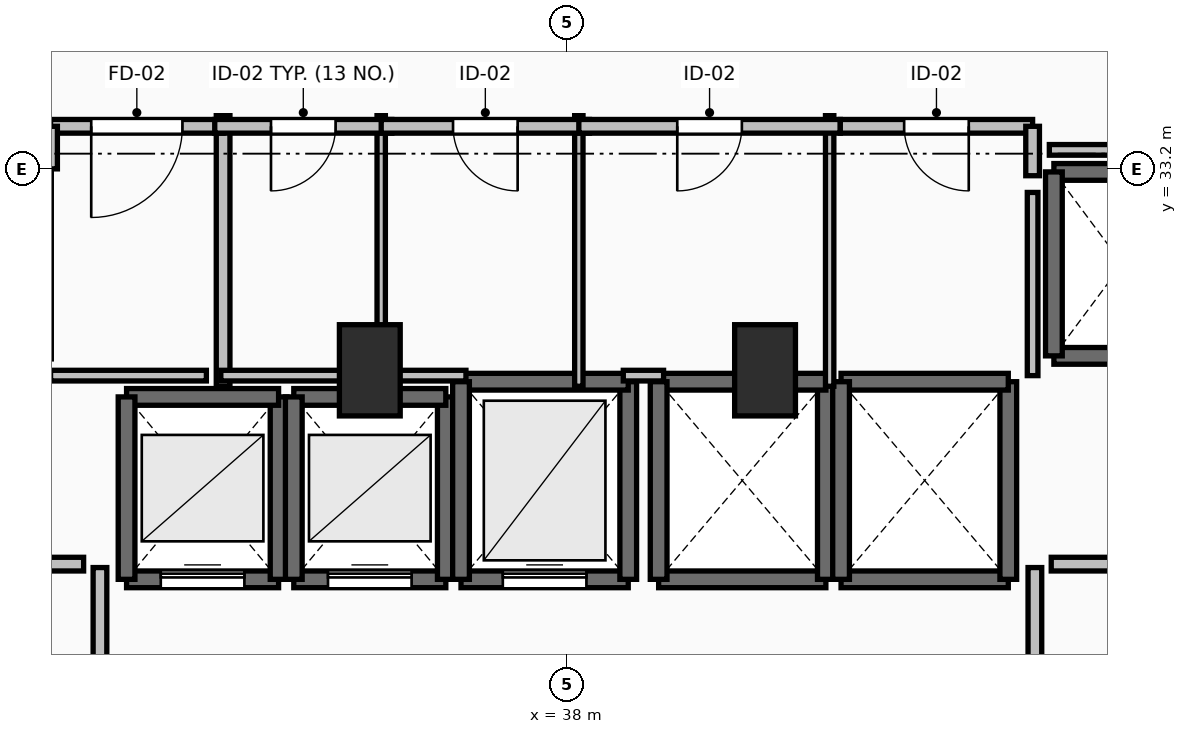
"""IFC4 building model, lengths in metres.
Left out: names, types, materials, properties, quantities, classifications, styles, units other than length and angle.
Written with IfcOpenShell. Run it as: python <this file> out.ifc"""

import sys

from ifc_helpers import new_model, si_unit, direction, frame, frame_2d, origin, origin_2d, place, context, subcontext, project, spatial, rectangle, extrude, element, fill, save


model = new_model("IFC4")
c1 = context("Model", 3, precision=1e-05, world=origin(), true_north=direction((0.0, 1.0)))
c2 = subcontext(c1, "Body", "Model", "MODEL_VIEW")
j1 = project(units=[si_unit("LENGTHUNIT", "METRE"), si_unit("PLANEANGLEUNIT", "RADIAN")], contexts=[c1])
p1 = place(None, origin())
s1 = spatial("IfcSite", under=j1, at=p1, CompositionType="ELEMENT")
p2 = place(p1, origin())
s2 = spatial("IfcBuilding", under=s1, at=p2, CompositionType="ELEMENT")
p3 = place(p2, frame((0.0, 0.0, 103.3)))
s3 = spatial("IfcBuildingStorey", under=s2, at=p3, CompositionType="ELEMENT", Elevation=103.3)
for number, where, z_axis, x_axis in (
    (1, (35.4, 30.55, 0.0), (0.0, 0.0, 1.0), (1.0, 0.0, 0.0)),
    (2, (40.6, 30.55, 0.0), (0.0, 0.0, 1.0), (1.0, 0.0, 0.0)),
):
    element("IfcColumn", number, at=place(p3, frame(where, z_axis=z_axis, x_axis=x_axis)), inside=s3, PredefinedType="PILASTER", context=c2, shape_type="SweptSolid", body=[
        extrude(rectangle(XDim=0.8, YDim=1.2, at=origin_2d()), origin(), (0.0, 0.0, 1.0), 3.5),
    ])
p4 = place(p3, frame((32.2, 27.8, 0.0), z_axis=(0.0, 0.0, 1.0), x_axis=(1.0, 0.0, 0.0)))
e3 = element("IfcWall", 3, at=p4, inside=s3, PredefinedType="SOLIDWALL", context=c2, shape_type="SweptSolid", body=[
    extrude(rectangle(XDim=2.0, YDim=0.22, at=frame_2d((1.0, 0.0))), origin(), (0.0, 0.0, 1.0), 3.24),
])
p5 = place(p4, frame((0.45, 0.0, 0.0)))
e4 = element("IfcOpeningElement", 4, at=p5, cuts=e3, PredefinedType="OPENING", context=c2, shape_type="SweptSolid", body=[
    extrude(rectangle(XDim=1.1, YDim=2.2, at=frame_2d((0.55, 1.1))), frame((0.0, 0.125, 0.0), z_axis=(0.0, -1.0, 0.0), x_axis=(1.0, 0.0, 0.0)), (0.0, 0.0, 1.0), 0.25),
])
p6 = place(p3, frame((34.2, 27.8, 0.0), z_axis=(0.0, 0.0, 1.0), x_axis=(0.0, 1.0, 0.0)))
e5 = element("IfcWall", 5, at=p6, inside=s3, PredefinedType="SOLIDWALL", context=c2, shape_type="SweptSolid", body=[
    extrude(rectangle(XDim=2.4, YDim=0.22, at=frame_2d((1.2, 0.0))), origin(), (0.0, 0.0, 1.0), 3.24),
])
p7 = place(p3, frame((34.2, 30.2, 0.0), z_axis=(0.0, 0.0, 1.0), x_axis=(-1.0, 0.0, 0.0)))
e6 = element("IfcWall", 6, at=p7, inside=s3, PredefinedType="SOLIDWALL", context=c2, shape_type="SweptSolid", body=[
    extrude(rectangle(XDim=2.0, YDim=0.22, at=frame_2d((1.0, 0.0))), origin(), (0.0, 0.0, 1.0), 3.24),
])
p8 = place(p3, frame((32.2, 30.2, 0.0), z_axis=(0.0, 0.0, 1.0), x_axis=(0.0, -1.0, 0.0)))
e7 = element("IfcWall", 7, at=p8, inside=s3, PredefinedType="SOLIDWALL", context=c2, shape_type="SweptSolid", body=[
    extrude(rectangle(XDim=2.4, YDim=0.22, at=frame_2d((1.2, 0.0))), origin(), (0.0, 0.0, 1.0), 3.24),
])
p9 = place(p3, frame((34.4, 27.8, 0.0), z_axis=(0.0, 0.0, 1.0), x_axis=(1.0, 0.0, 0.0)))
e8 = element("IfcWall", 8, at=p9, inside=s3, PredefinedType="SOLIDWALL", context=c2, shape_type="SweptSolid", body=[
    extrude(rectangle(XDim=2.0, YDim=0.22, at=frame_2d((1.0, 0.0))), origin(), (0.0, 0.0, 1.0), 3.24),
])
p10 = place(p9, frame((0.45, 0.0, 0.0)))
e9 = element("IfcOpeningElement", 9, at=p10, cuts=e8, PredefinedType="OPENING", context=c2, shape_type="SweptSolid", body=[
    extrude(rectangle(XDim=1.1, YDim=2.2, at=frame_2d((0.55, 1.1))), frame((0.0, 0.125, 0.0), z_axis=(0.0, -1.0, 0.0), x_axis=(1.0, 0.0, 0.0)), (0.0, 0.0, 1.0), 0.25),
])
p11 = place(p3, frame((36.4, 27.8, 0.0), z_axis=(0.0, 0.0, 1.0), x_axis=(0.0, 1.0, 0.0)))
e10 = element("IfcWall", 10, at=p11, inside=s3, PredefinedType="SOLIDWALL", context=c2, shape_type="SweptSolid", body=[
    extrude(rectangle(XDim=2.4, YDim=0.22, at=frame_2d((1.2, 0.0))), origin(), (0.0, 0.0, 1.0), 3.24),
])
p12 = place(p3, frame((36.4, 30.2, 0.0), z_axis=(0.0, 0.0, 1.0), x_axis=(-1.0, 0.0, 0.0)))
e11 = element("IfcWall", 11, at=p12, inside=s3, PredefinedType="SOLIDWALL", context=c2, shape_type="SweptSolid", body=[
    extrude(rectangle(XDim=2.0, YDim=0.22, at=frame_2d((1.0, 0.0))), origin(), (0.0, 0.0, 1.0), 3.24),
])
p13 = place(p3, frame((34.4, 30.2, 0.0), z_axis=(0.0, 0.0, 1.0), x_axis=(0.0, -1.0, 0.0)))
e12 = element("IfcWall", 12, at=p13, inside=s3, PredefinedType="SOLIDWALL", context=c2, shape_type="SweptSolid", body=[
    extrude(rectangle(XDim=2.4, YDim=0.22, at=frame_2d((1.2, 0.0))), origin(), (0.0, 0.0, 1.0), 3.24),
])
p14 = place(p3, frame((36.6, 27.8, 0.0), z_axis=(0.0, 0.0, 1.0), x_axis=(1.0, 0.0, 0.0)))
e13 = element("IfcWall", 13, at=p14, inside=s3, PredefinedType="SOLIDWALL", context=c2, shape_type="SweptSolid", body=[
    extrude(rectangle(XDim=2.2, YDim=0.22, at=frame_2d((1.1, 0.0))), origin(), (0.0, 0.0, 1.0), 3.24),
])
p15 = place(p14, frame((0.55, 0.0, 0.0)))
e14 = element("IfcOpeningElement", 14, at=p15, cuts=e13, PredefinedType="OPENING", context=c2, shape_type="SweptSolid", body=[
    extrude(rectangle(XDim=1.1, YDim=2.2, at=frame_2d((0.55, 1.1))), frame((0.0, 0.125, 0.0), z_axis=(0.0, -1.0, 0.0), x_axis=(1.0, 0.0, 0.0)), (0.0, 0.0, 1.0), 0.25),
])
p16 = place(p3, frame((38.8, 27.8, 0.0), z_axis=(0.0, 0.0, 1.0), x_axis=(0.0, 1.0, 0.0)))
e15 = element("IfcWall", 15, at=p16, inside=s3, PredefinedType="SOLIDWALL", context=c2, shape_type="SweptSolid", body=[
    extrude(rectangle(XDim=2.6, YDim=0.22, at=frame_2d((1.3, 0.0))), origin(), (0.0, 0.0, 1.0), 3.24),
])
p17 = place(p3, frame((38.8, 30.4, 0.0), z_axis=(0.0, 0.0, 1.0), x_axis=(-1.0, 0.0, 0.0)))
e16 = element("IfcWall", 16, at=p17, inside=s3, PredefinedType="SOLIDWALL", context=c2, shape_type="SweptSolid", body=[
    extrude(rectangle(XDim=2.2, YDim=0.22, at=frame_2d((1.1, 0.0))), origin(), (0.0, 0.0, 1.0), 3.24),
])
p18 = place(p3, frame((36.6, 30.4, 0.0), z_axis=(0.0, 0.0, 1.0), x_axis=(0.0, -1.0, 0.0)))
e17 = element("IfcWall", 17, at=p18, inside=s3, PredefinedType="SOLIDWALL", context=c2, shape_type="SweptSolid", body=[
    extrude(rectangle(XDim=2.6, YDim=0.22, at=frame_2d((1.3, 0.0))), origin(), (0.0, 0.0, 1.0), 3.24),
])
p19 = place(p3, frame((39.2, 27.8, 0.0), z_axis=(0.0, 0.0, 1.0), x_axis=(1.0, 0.0, 0.0)))
e18 = element("IfcWall", 18, at=p19, inside=s3, PredefinedType="SOLIDWALL", context=c2, shape_type="SweptSolid", body=[
    extrude(rectangle(XDim=2.2, YDim=0.22, at=frame_2d((1.1, 0.0))), origin(), (0.0, 0.0, 1.0), 3.24),
])
p20 = place(p3, frame((41.4, 27.8, 0.0), z_axis=(0.0, 0.0, 1.0), x_axis=(0.0, 1.0, 0.0)))
e19 = element("IfcWall", 19, at=p20, inside=s3, PredefinedType="SOLIDWALL", context=c2, shape_type="SweptSolid", body=[
    extrude(rectangle(XDim=2.6, YDim=0.22, at=frame_2d((1.3, 0.0))), origin(), (0.0, 0.0, 1.0), 3.24),
])
p21 = place(p3, frame((41.4, 30.4, 0.0), z_axis=(0.0, 0.0, 1.0), x_axis=(-1.0, 0.0, 0.0)))
e20 = element("IfcWall", 20, at=p21, inside=s3, PredefinedType="SOLIDWALL", context=c2, shape_type="SweptSolid", body=[
    extrude(rectangle(XDim=2.2, YDim=0.22, at=frame_2d((1.1, 0.0))), origin(), (0.0, 0.0, 1.0), 3.24),
])
p22 = place(p3, frame((39.2, 30.4, 0.0), z_axis=(0.0, 0.0, 1.0), x_axis=(0.0, -1.0, 0.0)))
e21 = element("IfcWall", 21, at=p22, inside=s3, PredefinedType="SOLIDWALL", context=c2, shape_type="SweptSolid", body=[
    extrude(rectangle(XDim=2.6, YDim=0.22, at=frame_2d((1.3, 0.0))), origin(), (0.0, 0.0, 1.0), 3.24),
])
p23 = place(p3, frame((41.6, 27.8, 0.0), z_axis=(0.0, 0.0, 1.0), x_axis=(1.0, 0.0, 0.0)))
e22 = element("IfcWall", 22, at=p23, inside=s3, PredefinedType="SOLIDWALL", context=c2, shape_type="SweptSolid", body=[
    extrude(rectangle(XDim=2.2, YDim=0.22, at=frame_2d((1.1, 0.0))), origin(), (0.0, 0.0, 1.0), 3.24),
])
p24 = place(p3, frame((43.8, 27.8, 0.0), z_axis=(0.0, 0.0, 1.0), x_axis=(0.0, 1.0, 0.0)))
e23 = element("IfcWall", 23, at=p24, inside=s3, PredefinedType="SOLIDWALL", context=c2, shape_type="SweptSolid", body=[
    extrude(rectangle(XDim=2.6, YDim=0.22, at=frame_2d((1.3, 0.0))), origin(), (0.0, 0.0, 1.0), 3.24),
])
p25 = place(p3, frame((43.8, 30.4, 0.0), z_axis=(0.0, 0.0, 1.0), x_axis=(-1.0, 0.0, 0.0)))
e24 = element("IfcWall", 24, at=p25, inside=s3, PredefinedType="SOLIDWALL", context=c2, shape_type="SweptSolid", body=[
    extrude(rectangle(XDim=2.2, YDim=0.22, at=frame_2d((1.1, 0.0))), origin(), (0.0, 0.0, 1.0), 3.24),
])
p26 = place(p3, frame((41.6, 30.4, 0.0), z_axis=(0.0, 0.0, 1.0), x_axis=(0.0, -1.0, 0.0)))
e25 = element("IfcWall", 25, at=p26, inside=s3, PredefinedType="SOLIDWALL", context=c2, shape_type="SweptSolid", body=[
    extrude(rectangle(XDim=2.6, YDim=0.22, at=frame_2d((1.3, 0.0))), origin(), (0.0, 0.0, 1.0), 3.24),
])
for number, where, z_axis, x_axis in (
    (26, (44.4, 30.74, 0.0), (0.0, 0.0, 1.0), (1.0, 0.0, 0.0)),
    (27, (46.2, 33.16, 0.0), (0.0, 0.0, 1.0), (-1.0, 0.0, 0.0)),
):
    element("IfcWall", number, at=place(p3, frame(where, z_axis=z_axis, x_axis=x_axis)), inside=s3, PredefinedType="SOLIDWALL", context=c2, shape_type="SweptSolid", body=[
        extrude(rectangle(XDim=1.8, YDim=0.22, at=frame_2d((0.9, 0.0))), origin(), (0.0, 0.0, 1.0), 3.24),
    ])
p27 = place(p3, frame((44.4, 33.16, 0.0), z_axis=(0.0, 0.0, 1.0), x_axis=(0.0, -1.0, 0.0)))
e28 = element("IfcWall", 28, at=p27, inside=s3, PredefinedType="SOLIDWALL", context=c2, shape_type="SweptSolid", body=[
    extrude(rectangle(XDim=2.42, YDim=0.22, at=frame_2d((1.21, 0.0))), origin(), (0.0, 0.0, 1.0), 3.24),
])
p28 = place(p3, frame((31.85, 24.045, 0.0), z_axis=(0.0, 0.0, 1.0), x_axis=(0.0, 1.0, 0.0)))
e29 = element("IfcWall", 29, at=p28, inside=s3, PredefinedType="PARTITIONING", context=c2, shape_type="SweptSolid", body=[
    extrude(rectangle(XDim=3.91, YDim=0.18, at=frame_2d((1.955, 0.0))), origin(), (0.0, 0.0, 1.0), 3.24),
])
p29 = place(p28, frame((1.355, 0.0, 0.0)))
e30 = element("IfcOpeningElement", 30, at=p29, cuts=e29, PredefinedType="OPENING", context=c2, shape_type="SweptSolid", body=[
    extrude(rectangle(XDim=1.2, YDim=2.15, at=frame_2d((0.6, 1.075))), frame((0.0, 0.105, 0.0), z_axis=(0.0, -1.0, 0.0), x_axis=(1.0, 0.0, 0.0)), (0.0, 0.0, 1.0), 0.21),
])
p30 = place(p3, frame((44.15, 27.955, 0.0), z_axis=(0.0, 0.0, 1.0), x_axis=(0.0, -1.0, 0.0)))
e31 = element("IfcWall", 31, at=p30, inside=s3, PredefinedType="PARTITIONING", context=c2, shape_type="SweptSolid", body=[
    extrude(rectangle(XDim=3.91, YDim=0.18, at=frame_2d((1.955, 0.0))), origin(), (0.0, 0.0, 1.0), 3.24),
])
p31 = place(p30, frame((1.355, 0.0, 0.0)))
e32 = element("IfcOpeningElement", 32, at=p31, cuts=e31, PredefinedType="OPENING", context=c2, shape_type="SweptSolid", body=[
    extrude(rectangle(XDim=1.2, YDim=2.15, at=frame_2d((0.6, 1.075))), frame((0.0, 0.105, 0.0), z_axis=(0.0, -1.0, 0.0), x_axis=(1.0, 0.0, 0.0)), (0.0, 0.0, 1.0), 0.21),
])
p32 = place(p3, frame((33.47, 30.34, 0.0), z_axis=(0.0, 0.0, 1.0), x_axis=(0.0, 1.0, 0.0)))
e33 = element("IfcWall", 33, at=p32, inside=s3, PredefinedType="PARTITIONING", context=c2, shape_type="SweptSolid", body=[
    extrude(rectangle(XDim=3.56, YDim=0.18, at=frame_2d((1.78, 0.0))), origin(), (0.0, 0.0, 1.0), 3.24),
])
p33 = place(p3, frame((33.47, 33.76, 0.0), z_axis=(0.0, 0.0, 1.0), x_axis=(-1.0, 0.0, 0.0)))
e34 = element("IfcWall", 34, at=p33, inside=s3, PredefinedType="PARTITIONING", context=c2, shape_type="SweptSolid", body=[
    extrude(rectangle(XDim=2.27, YDim=0.18, at=frame_2d((1.135, 0.0))), origin(), (0.0, 0.0, 1.0), 3.24),
])
p34 = place(p33, frame((0.535, 0.0, 0.0)))
e35 = element("IfcOpeningElement", 35, at=p34, cuts=e34, PredefinedType="OPENING", context=c2, shape_type="SweptSolid", body=[
    extrude(rectangle(XDim=1.2, YDim=2.15, at=frame_2d((0.6, 1.075))), frame((0.0, 0.105, 0.0), z_axis=(0.0, -1.0, 0.0), x_axis=(1.0, 0.0, 0.0)), (0.0, 0.0, 1.0), 0.21),
])
p35 = place(p3, frame((31.2, 33.76, 0.0), z_axis=(0.0, 0.0, 1.0), x_axis=(0.0, -1.0, 0.0)))
e36 = element("IfcWall", 36, at=p35, inside=s3, PredefinedType="PARTITIONING", context=c2, shape_type="SweptSolid", body=[
    extrude(rectangle(XDim=0.56, YDim=0.18, at=frame_2d((0.28, 0.0))), origin(), (0.0, 0.0, 1.0), 3.24),
])
p36 = place(p3, frame((35.55, 30.34, 0.0), z_axis=(0.0, 0.0, 1.0), x_axis=(0.0, 1.0, 0.0)))
e37 = element("IfcWall", 37, at=p36, inside=s3, PredefinedType="PARTITIONING", context=c2, shape_type="SweptSolid", body=[
    extrude(rectangle(XDim=3.56, YDim=0.11, at=frame_2d((1.78, 0.0))), origin(), (0.0, 0.0, 1.0), 2.432),
])
p37 = place(p3, frame((35.69, 33.76, 0.0), z_axis=(0.0, 0.0, 1.0), x_axis=(-1.0, 0.0, 0.0)))
e38 = element("IfcWall", 38, at=p37, inside=s3, PredefinedType="PARTITIONING", context=c2, shape_type="SweptSolid", body=[
    extrude(rectangle(XDim=2.33, YDim=0.18, at=frame_2d((1.165, 0.0))), origin(), (0.0, 0.0, 1.0), 3.24),
])
p38 = place(p37, frame((0.74, 0.0, 0.0)))
e39 = element("IfcOpeningElement", 39, at=p38, cuts=e38, PredefinedType="OPENING", context=c2, shape_type="SweptSolid", body=[
    extrude(rectangle(XDim=0.85, YDim=2.1, at=frame_2d((0.425, 1.05))), frame((0.0, 0.105, 0.0), z_axis=(0.0, -1.0, 0.0), x_axis=(1.0, 0.0, 0.0)), (0.0, 0.0, 1.0), 0.21),
])
p39 = place(p3, frame((38.15, 30.34, 0.0), z_axis=(0.0, 0.0, 1.0), x_axis=(0.0, 1.0, 0.0)))
e40 = element("IfcWall", 40, at=p39, inside=s3, PredefinedType="PARTITIONING", context=c2, shape_type="SweptSolid", body=[
    extrude(rectangle(XDim=3.56, YDim=0.11, at=frame_2d((1.78, 0.0))), origin(), (0.0, 0.0, 1.0), 2.432),
])
p40 = place(p3, frame((38.29, 33.76, 0.0), z_axis=(0.0, 0.0, 1.0), x_axis=(-1.0, 0.0, 0.0)))
e41 = element("IfcWall", 41, at=p40, inside=s3, PredefinedType="PARTITIONING", context=c2, shape_type="SweptSolid", body=[
    extrude(rectangle(XDim=2.74, YDim=0.18, at=frame_2d((1.37, 0.0))), origin(), (0.0, 0.0, 1.0), 3.24),
])
p41 = place(p40, frame((0.945, 0.0, 0.0)))
e42 = element("IfcOpeningElement", 42, at=p41, cuts=e41, PredefinedType="OPENING", context=c2, shape_type="SweptSolid", body=[
    extrude(rectangle(XDim=0.85, YDim=2.1, at=frame_2d((0.425, 1.05))), frame((0.0, 0.105, 0.0), z_axis=(0.0, -1.0, 0.0), x_axis=(1.0, 0.0, 0.0)), (0.0, 0.0, 1.0), 0.21),
])
p42 = place(p3, frame((41.45, 30.34, 0.0), z_axis=(0.0, 0.0, 1.0), x_axis=(0.0, 1.0, 0.0)))
e43 = element("IfcWall", 43, at=p42, inside=s3, PredefinedType="PARTITIONING", context=c2, shape_type="SweptSolid", body=[
    extrude(rectangle(XDim=3.56, YDim=0.11, at=frame_2d((1.78, 0.0))), origin(), (0.0, 0.0, 1.0), 3.24),
])
p43 = place(p3, frame((41.59, 33.76, 0.0), z_axis=(0.0, 0.0, 1.0), x_axis=(-1.0, 0.0, 0.0)))
e44 = element("IfcWall", 44, at=p43, inside=s3, PredefinedType="PARTITIONING", context=c2, shape_type="SweptSolid", body=[
    extrude(rectangle(XDim=3.44, YDim=0.18, at=frame_2d((1.72, 0.0))), origin(), (0.0, 0.0, 1.0), 3.24),
])
p44 = place(p43, frame((1.295, 0.0, 0.0)))
e45 = element("IfcOpeningElement", 45, at=p44, cuts=e44, PredefinedType="OPENING", context=c2, shape_type="SweptSolid", body=[
    extrude(rectangle(XDim=0.85, YDim=2.1, at=frame_2d((0.425, 1.05))), frame((0.0, 0.105, 0.0), z_axis=(0.0, -1.0, 0.0), x_axis=(1.0, 0.0, 0.0)), (0.0, 0.0, 1.0), 0.21),
])
p45 = place(p3, frame((44.12, 33.76, 0.0), z_axis=(0.0, 0.0, 1.0), x_axis=(-1.0, 0.0, 0.0)))
e46 = element("IfcWall", 46, at=p45, inside=s3, PredefinedType="PARTITIONING", context=c2, shape_type="SweptSolid", body=[
    extrude(rectangle(XDim=2.53, YDim=0.18, at=frame_2d((1.265, 0.0))), origin(), (0.0, 0.0, 1.0), 3.24),
])
p46 = place(p45, frame((0.84, 0.0, 0.0)))
e47 = element("IfcOpeningElement", 47, at=p46, cuts=e46, PredefinedType="OPENING", context=c2, shape_type="SweptSolid", body=[
    extrude(rectangle(XDim=0.85, YDim=2.1, at=frame_2d((0.425, 1.05))), frame((0.0, 0.105, 0.0), z_axis=(0.0, -1.0, 0.0), x_axis=(1.0, 0.0, 0.0)), (0.0, 0.0, 1.0), 0.21),
])
p47 = place(p3, frame((44.12, 33.11, 0.0), z_axis=(0.0, 0.0, 1.0), x_axis=(0.0, 1.0, 0.0)))
e48 = element("IfcWall", 48, at=p47, inside=s3, PredefinedType="PARTITIONING", context=c2, shape_type="SweptSolid", body=[
    extrude(rectangle(XDim=0.65, YDim=0.18, at=frame_2d((0.325, 0.0))), origin(), (0.0, 0.0, 1.0), 3.24),
])
for number, where, z_axis, x_axis in (
    (49, (31.635, 28.0, 0.0), (0.0, 0.0, 1.0), (-1.0, 0.0, 0.0)),
    (50, (45.28, 28.0, 0.0), (0.0, 0.0, 1.0), (-1.0, 0.0, 0.0)),
):
    element("IfcWall", number, at=place(p3, frame(where, z_axis=z_axis, x_axis=x_axis)), inside=s3, PredefinedType="PARTITIONING", context=c2, shape_type="SweptSolid", body=[
        extrude(rectangle(XDim=0.915, YDim=0.18, at=frame_2d((0.458, 0.0))), origin(), (0.0, 0.0, 1.0), 3.24),
    ])
p48 = place(p3, frame((31.2, 30.48, 0.0), z_axis=(0.0, 0.0, 1.0), x_axis=(1.0, 0.0, 0.0)))
e51 = element("IfcWall", 51, at=p48, inside=s3, PredefinedType="PARTITIONING", context=c2, shape_type="SweptSolid", body=[
    extrude(rectangle(XDim=2.05, YDim=0.14, at=frame_2d((1.025, 0.0))), origin(), (0.0, 0.0, 1.0), 3.24),
])
p49 = place(p3, frame((33.44, 30.48, 0.0), z_axis=(0.0, 0.0, 1.0), x_axis=(1.0, 0.0, 0.0)))
e52 = element("IfcWall", 52, at=p49, inside=s3, PredefinedType="PARTITIONING", context=c2, shape_type="SweptSolid", body=[
    extrude(rectangle(XDim=2.14, YDim=0.14, at=frame_2d((1.07, 0.0))), origin(), (0.0, 0.0, 1.0), 2.432),
])
p50 = place(p3, frame((35.6, 30.48, 0.0), z_axis=(0.0, 0.0, 1.0), x_axis=(1.0, 0.0, 0.0)))
e53 = element("IfcWall", 53, at=p50, inside=s3, PredefinedType="PARTITIONING", context=c2, shape_type="SweptSolid", body=[
    extrude(rectangle(XDim=1.065, YDim=0.14, at=frame_2d((0.532, 0.0))), origin(), (0.0, 0.0, 1.0), 2.432),
])
p51 = place(p3, frame((38.735, 30.48, 0.0), z_axis=(0.0, 0.0, 1.0), x_axis=(1.0, 0.0, 0.0)))
e54 = element("IfcWall", 54, at=p51, inside=s3, PredefinedType="PARTITIONING", context=c2, shape_type="SweptSolid", body=[
    extrude(rectangle(XDim=0.53, YDim=0.14, at=frame_2d((0.265, 0.0))), origin(), (0.0, 0.0, 1.0), 2.432),
])
p52 = place(p3, frame((44.12, 30.48, 0.0), z_axis=(0.0, 0.0, 1.0), x_axis=(0.0, 1.0, 0.0)))
e55 = element("IfcWall", 55, at=p52, inside=s3, PredefinedType="PARTITIONING", context=c2, shape_type="SweptSolid", body=[
    extrude(rectangle(XDim=2.41, YDim=0.14, at=frame_2d((1.205, 0.0))), origin(), (0.0, 0.0, 1.0), 3.24),
])
p53 = place(p3, frame((44.34, 33.45, 0.0), z_axis=(0.0, 0.0, 1.0), x_axis=(1.0, 0.0, 0.0)))
e56 = element("IfcWall", 56, at=p53, inside=s3, PredefinedType="PARTITIONING", context=c2, shape_type="SweptSolid", body=[
    extrude(rectangle(XDim=4.21, YDim=0.14, at=frame_2d((2.105, 0.0))), origin(), (0.0, 0.0, 1.0), 2.432),
])
p54 = place(p5, origin())
e57 = element("IfcDoor", 57, at=p54, inside=s3, OperationType="SLIDING_TO_LEFT", PredefinedType="DOOR", context=c2, shape_type="SweptSolid", body=[
    extrude(rectangle(XDim=1.1, YDim=2.2, at=frame_2d((0.55, 1.1))), frame((0.0, 0.025, 0.0), z_axis=(0.0, -1.0, 0.0), x_axis=(1.0, 0.0, 0.0)), (0.0, 0.0, 1.0), 0.05),
])
fill(e4, e57)
p55 = place(p10, origin())
e58 = element("IfcDoor", 58, at=p55, inside=s3, OperationType="SLIDING_TO_LEFT", PredefinedType="DOOR", context=c2, shape_type="SweptSolid", body=[
    extrude(rectangle(XDim=1.1, YDim=2.2, at=frame_2d((0.55, 1.1))), frame((0.0, 0.025, 0.0), z_axis=(0.0, -1.0, 0.0), x_axis=(1.0, 0.0, 0.0)), (0.0, 0.0, 1.0), 0.05),
])
fill(e9, e58)
p56 = place(p15, origin())
e59 = element("IfcDoor", 59, at=p56, inside=s3, OperationType="SLIDING_TO_LEFT", PredefinedType="DOOR", context=c2, shape_type="SweptSolid", body=[
    extrude(rectangle(XDim=1.1, YDim=2.2, at=frame_2d((0.55, 1.1))), frame((0.0, 0.025, 0.0), z_axis=(0.0, -1.0, 0.0), x_axis=(1.0, 0.0, 0.0)), (0.0, 0.0, 1.0), 0.05),
])
fill(e14, e59)
p57 = place(p34, origin())
e60 = element("IfcDoor", 60, at=p57, inside=s3, OperationType="SINGLE_SWING_RIGHT", PredefinedType="DOOR", context=c2, shape_type="SweptSolid", body=[
    extrude(rectangle(XDim=1.2, YDim=2.15, at=frame_2d((0.6, 1.075))), frame((0.0, 0.025, 0.0), z_axis=(0.0, -1.0, 0.0), x_axis=(1.0, 0.0, 0.0)), (0.0, 0.0, 1.0), 0.05),
])
fill(e35, e60)
p58 = place(p38, origin())
e61 = element("IfcDoor", 61, at=p58, inside=s3, OperationType="SINGLE_SWING_RIGHT", PredefinedType="DOOR", context=c2, shape_type="SweptSolid", body=[
    extrude(rectangle(XDim=0.85, YDim=2.1, at=frame_2d((0.425, 1.05))), frame((0.0, 0.025, 0.0), z_axis=(0.0, -1.0, 0.0), x_axis=(1.0, 0.0, 0.0)), (0.0, 0.0, 1.0), 0.05),
])
fill(e39, e61)
p59 = place(p41, origin())
e62 = element("IfcDoor", 62, at=p59, inside=s3, OperationType="SINGLE_SWING_LEFT", PredefinedType="DOOR", context=c2, shape_type="SweptSolid", body=[
    extrude(rectangle(XDim=0.85, YDim=2.1, at=frame_2d((0.425, 1.05))), frame((0.0, 0.025, 0.0), z_axis=(0.0, -1.0, 0.0), x_axis=(1.0, 0.0, 0.0)), (0.0, 0.0, 1.0), 0.05),
])
fill(e42, e62)
p60 = place(p44, origin())
e63 = element("IfcDoor", 63, at=p60, inside=s3, OperationType="SINGLE_SWING_RIGHT", PredefinedType="DOOR", context=c2, shape_type="SweptSolid", body=[
    extrude(rectangle(XDim=0.85, YDim=2.1, at=frame_2d((0.425, 1.05))), frame((0.0, 0.025, 0.0), z_axis=(0.0, -1.0, 0.0), x_axis=(1.0, 0.0, 0.0)), (0.0, 0.0, 1.0), 0.05),
])
fill(e45, e63)
p61 = place(p46, origin())
e64 = element("IfcDoor", 64, at=p61, inside=s3, OperationType="SINGLE_SWING_LEFT", PredefinedType="DOOR", context=c2, shape_type="SweptSolid", body=[
    extrude(rectangle(XDim=0.85, YDim=2.1, at=frame_2d((0.425, 1.05))), frame((0.0, 0.025, 0.0), z_axis=(0.0, -1.0, 0.0), x_axis=(1.0, 0.0, 0.0)), (0.0, 0.0, 1.0), 0.05),
])
fill(e47, e64)
save(model, sys.argv[1])
